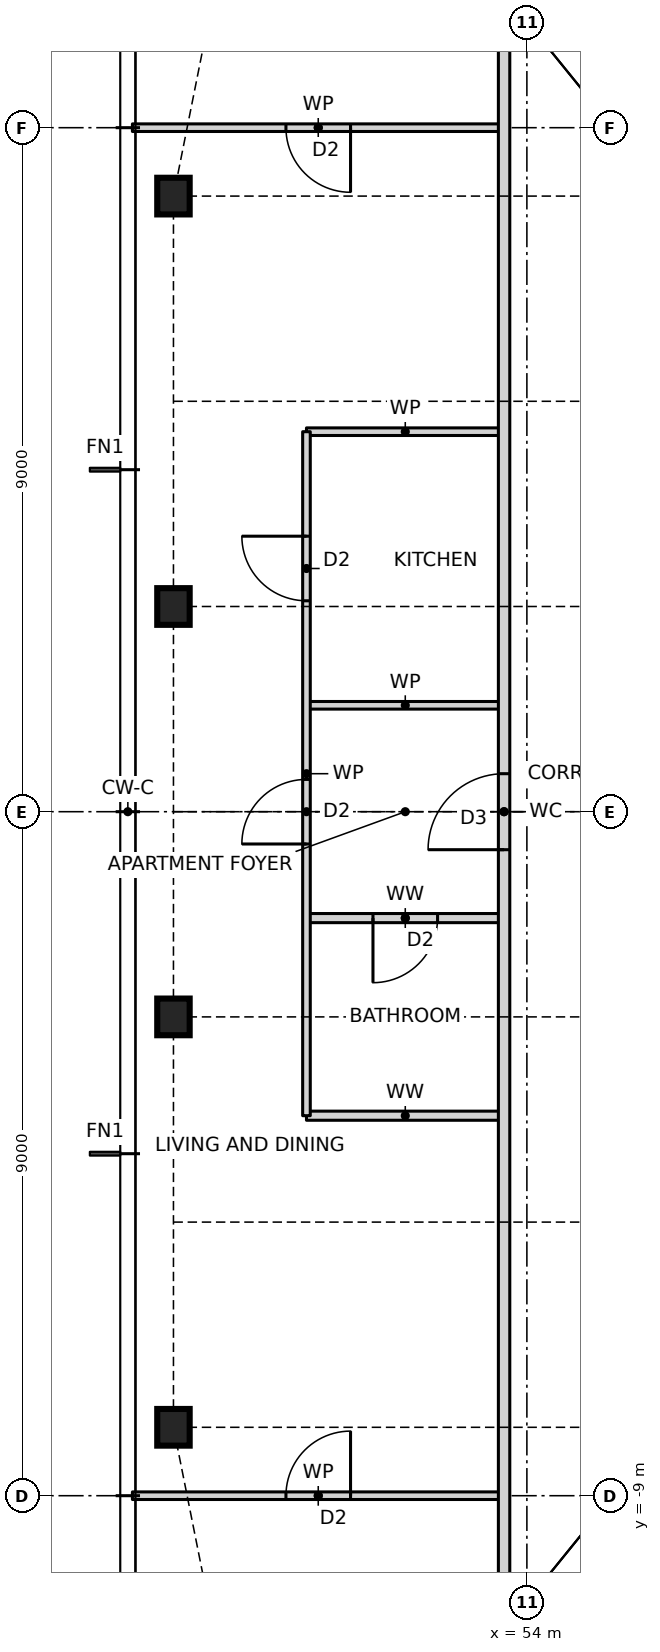
"""IFC4 building model, lengths in metres.
Left out: names, types, materials, properties, quantities, classifications, styles, units other than length and angle.
Written with IfcOpenShell. Run it as: python <this file> out.ifc"""

import sys

from ifc_helpers import new_model, si_unit, direction, frame, frame_2d, origin, origin_2d, place, context, subcontext, project, spatial, rectangle, i_section, extrude, element, fill, save


model = new_model("IFC4")
c1 = context("Model", 3, precision=1e-05, world=origin(), true_north=direction((0.0, 1.0)))
c2 = subcontext(c1, "Body", "Model", "MODEL_VIEW")
j1 = project(units=[si_unit("LENGTHUNIT", "METRE"), si_unit("PLANEANGLEUNIT", "RADIAN")], contexts=[c1])
p1 = place(None, origin())
s1 = spatial("IfcSite", under=j1, at=p1, CompositionType="ELEMENT")
p2 = place(p1, origin())
s2 = spatial("IfcBuilding", under=s1, at=p2, CompositionType="ELEMENT")
p3 = place(p2, frame((0.0, 0.0, 91.0)))
s3 = spatial("IfcBuildingStorey", under=s2, at=p3, CompositionType="ELEMENT", Elevation=91.0)
for number, where, z_axis, x_axis in (
    (1, (49.35, 8.1, 0.0), (0.0, 0.0, 1.0), (1.0, 0.0, 0.0)),
    (2, (49.35, 2.7, 0.0), (0.0, 0.0, 1.0), (1.0, 0.0, 0.0)),
    (3, (49.35, -2.7, 0.0), (0.0, 0.0, 1.0), (1.0, 0.0, 0.0)),
    (4, (49.35, -8.1, 0.0), (0.0, 0.0, 1.0), (1.0, 0.0, 0.0)),
):
    element("IfcColumn", number, at=place(p3, frame(where, z_axis=z_axis, x_axis=x_axis)), inside=s3, PredefinedType="COLUMN", context=c2, shape_type="SweptSolid", body=[
        extrude(i_section(OverallWidth=0.427, OverallDepth=0.483, WebThickness=0.051, FlangeThickness=0.082, at=origin_2d()), origin(), (0.0, 0.0, 1.0), 3.5),
    ])
p4 = place(p3, frame((48.81, -9.0, 0.0), z_axis=(0.0, 0.0, 1.0), x_axis=(1.0, 0.0, 0.0)))
e5 = element("IfcWall", 5, at=p4, inside=s3, PredefinedType="PARTITIONING", context=c2, shape_type="SweptSolid", body=[
    extrude(rectangle(XDim=4.89, YDim=0.1, at=frame_2d((2.445, 0.0))), origin(), (0.0, 0.0, 1.0), 3.27),
])
p5 = place(p4, frame((2.02, 0.0, 0.0)))
e6 = element("IfcOpeningElement", 6, at=p5, cuts=e5, PredefinedType="OPENING", context=c2, shape_type="SweptSolid", body=[
    extrude(rectangle(XDim=0.85, YDim=2.1, at=frame_2d((0.425, 1.05))), frame((0.0, 0.06, 0.0), z_axis=(0.0, -1.0, 0.0), x_axis=(1.0, 0.0, 0.0)), (0.0, 0.0, 1.0), 0.12),
])
p6 = place(p3, frame((51.1, -4.0, 0.0), z_axis=(0.0, 0.0, 1.0), x_axis=(1.0, 0.0, 0.0)))
e7 = element("IfcWall", 7, at=p6, inside=s3, PredefinedType="PARTITIONING", context=c2, shape_type="SweptSolid", body=[
    extrude(rectangle(XDim=2.6, YDim=0.12, at=frame_2d((1.3, 0.0))), origin(), (0.0, 0.0, 1.0), 3.27),
])
p7 = place(p3, frame((51.1, -1.4, 0.0), z_axis=(0.0, 0.0, 1.0), x_axis=(1.0, 0.0, 0.0)))
e8 = element("IfcWall", 8, at=p7, inside=s3, PredefinedType="PARTITIONING", context=c2, shape_type="SweptSolid", body=[
    extrude(rectangle(XDim=2.6, YDim=0.12, at=frame_2d((1.3, 0.0))), origin(), (0.0, 0.0, 1.0), 3.27),
])
p8 = place(p7, frame((0.875, 0.0, 0.0)))
e9 = element("IfcOpeningElement", 9, at=p8, cuts=e8, PredefinedType="OPENING", context=c2, shape_type="SweptSolid", body=[
    extrude(rectangle(XDim=0.85, YDim=2.1, at=frame_2d((0.425, 1.05))), frame((0.0, 0.07, 0.0), z_axis=(0.0, -1.0, 0.0), x_axis=(1.0, 0.0, 0.0)), (0.0, 0.0, 1.0), 0.14),
])
for number, where, z_axis, x_axis in (
    (10, (51.1, 1.4, 0.0), (0.0, 0.0, 1.0), (1.0, 0.0, 0.0)),
    (11, (51.1, 5.0, 0.0), (0.0, 0.0, 1.0), (1.0, 0.0, 0.0)),
):
    element("IfcWall", number, at=place(p3, frame(where, z_axis=z_axis, x_axis=x_axis)), inside=s3, PredefinedType="PARTITIONING", context=c2, shape_type="SweptSolid", body=[
        extrude(rectangle(XDim=2.6, YDim=0.1, at=frame_2d((1.3, 0.0))), origin(), (0.0, 0.0, 1.0), 3.27),
    ])
p9 = place(p3, frame((48.81, 9.0, 0.0), z_axis=(0.0, 0.0, 1.0), x_axis=(1.0, 0.0, 0.0)))
e12 = element("IfcWall", 12, at=p9, inside=s3, PredefinedType="PARTITIONING", context=c2, shape_type="SweptSolid", body=[
    extrude(rectangle(XDim=4.89, YDim=0.1, at=frame_2d((2.445, 0.0))), origin(), (0.0, 0.0, 1.0), 3.27),
])
p10 = place(p9, frame((2.02, 0.0, 0.0)))
e13 = element("IfcOpeningElement", 13, at=p10, cuts=e12, PredefinedType="OPENING", context=c2, shape_type="SweptSolid", body=[
    extrude(rectangle(XDim=0.85, YDim=2.1, at=frame_2d((0.425, 1.05))), frame((0.0, 0.06, 0.0), z_axis=(0.0, -1.0, 0.0), x_axis=(1.0, 0.0, 0.0)), (0.0, 0.0, 1.0), 0.12),
])
p11 = place(p3, frame((53.7, -10.768, 0.0), z_axis=(0.0, 0.0, 1.0), x_axis=(0.0, 1.0, 0.0)))
e14 = element("IfcWall", 14, at=p11, inside=s3, PredefinedType="PARTITIONING", context=c2, shape_type="SweptSolid", body=[
    extrude(rectangle(XDim=21.536, YDim=0.15, at=frame_2d((10.768, 0.0))), origin(), (0.0, 0.0, 1.0), 3.27),
])
p12 = place(p11, frame((10.268, 0.0, 0.0)))
e15 = element("IfcOpeningElement", 15, at=p12, cuts=e14, PredefinedType="OPENING", context=c2, shape_type="SweptSolid", body=[
    extrude(rectangle(XDim=1.0, YDim=2.1, at=frame_2d((0.5, 1.05))), frame((0.0, 0.085, 0.0), z_axis=(0.0, -1.0, 0.0), x_axis=(1.0, 0.0, 0.0)), (0.0, 0.0, 1.0), 0.17),
])
p13 = place(p3, frame((51.1, -4.0, 0.0), z_axis=(0.0, 0.0, 1.0), x_axis=(0.0, 1.0, 0.0)))
e16 = element("IfcWall", 16, at=p13, inside=s3, PredefinedType="PARTITIONING", context=c2, shape_type="SweptSolid", body=[
    extrude(rectangle(XDim=9.0, YDim=0.1, at=frame_2d((4.5, 0.0))), origin(), (0.0, 0.0, 1.0), 3.27),
])
p14 = place(p13, frame((6.775, 0.0, 0.0)))
e17 = element("IfcOpeningElement", 17, at=p14, cuts=e16, PredefinedType="OPENING", context=c2, shape_type="SweptSolid", body=[
    extrude(rectangle(XDim=0.85, YDim=2.1, at=frame_2d((0.425, 1.05))), frame((0.0, 0.06, 0.0), z_axis=(0.0, -1.0, 0.0), x_axis=(1.0, 0.0, 0.0)), (0.0, 0.0, 1.0), 0.12),
])
p15 = place(p13, frame((3.575, 0.0, 0.0)))
e18 = element("IfcOpeningElement", 18, at=p15, cuts=e16, PredefinedType="OPENING", context=c2, shape_type="SweptSolid", body=[
    extrude(rectangle(XDim=0.85, YDim=2.1, at=frame_2d((0.425, 1.05))), frame((0.0, 0.06, 0.0), z_axis=(0.0, -1.0, 0.0), x_axis=(1.0, 0.0, 0.0)), (0.0, 0.0, 1.0), 0.12),
])
p16 = place(p14, origin())
e19 = element("IfcDoor", 19, at=p16, inside=s3, OperationType="SINGLE_SWING_RIGHT", PredefinedType="DOOR", context=c2, shape_type="SweptSolid", body=[
    extrude(rectangle(XDim=0.85, YDim=2.1, at=frame_2d((0.425, 1.05))), frame((0.0, 0.025, 0.0), z_axis=(0.0, -1.0, 0.0), x_axis=(1.0, 0.0, 0.0)), (0.0, 0.0, 1.0), 0.05),
])
fill(e17, e19)
p17 = place(p12, origin())
e20 = element("IfcDoor", 20, at=p17, inside=s3, OperationType="SINGLE_SWING_LEFT", PredefinedType="DOOR", context=c2, shape_type="SweptSolid", body=[
    extrude(rectangle(XDim=1.0, YDim=2.1, at=frame_2d((0.5, 1.05))), frame((0.0, 0.025, 0.0), z_axis=(0.0, -1.0, 0.0), x_axis=(1.0, 0.0, 0.0)), (0.0, 0.0, 1.0), 0.05),
])
fill(e15, e20)
p18 = place(p15, origin())
e21 = element("IfcDoor", 21, at=p18, inside=s3, OperationType="SINGLE_SWING_LEFT", PredefinedType="DOOR", context=c2, shape_type="SweptSolid", body=[
    extrude(rectangle(XDim=0.85, YDim=2.1, at=frame_2d((0.425, 1.05))), frame((0.0, 0.025, 0.0), z_axis=(0.0, -1.0, 0.0), x_axis=(1.0, 0.0, 0.0)), (0.0, 0.0, 1.0), 0.05),
])
fill(e18, e21)
p19 = place(p8, frame((0.85, 0.0, 0.0), z_axis=(0.0, 0.0, 1.0), x_axis=(-1.0, 0.0, 0.0)))
e22 = element("IfcDoor", 22, at=p19, inside=s3, OperationType="SINGLE_SWING_RIGHT", PredefinedType="DOOR", context=c2, shape_type="SweptSolid", body=[
    extrude(rectangle(XDim=0.85, YDim=2.1, at=frame_2d((0.425, 1.05))), frame((0.0, 0.025, 0.0), z_axis=(0.0, -1.0, 0.0), x_axis=(1.0, 0.0, 0.0)), (0.0, 0.0, 1.0), 0.05),
])
fill(e9, e22)
p20 = place(p10, frame((0.85, 0.0, 0.0), z_axis=(0.0, 0.0, 1.0), x_axis=(-1.0, 0.0, 0.0)))
e23 = element("IfcDoor", 23, at=p20, inside=s3, OperationType="SINGLE_SWING_LEFT", PredefinedType="DOOR", context=c2, shape_type="SweptSolid", body=[
    extrude(rectangle(XDim=0.85, YDim=2.1, at=frame_2d((0.425, 1.05))), frame((0.0, 0.025, 0.0), z_axis=(0.0, -1.0, 0.0), x_axis=(1.0, 0.0, 0.0)), (0.0, 0.0, 1.0), 0.05),
])
fill(e13, e23)
p21 = place(p5, origin())
e24 = element("IfcDoor", 24, at=p21, inside=s3, OperationType="SINGLE_SWING_RIGHT", PredefinedType="DOOR", context=c2, shape_type="SweptSolid", body=[
    extrude(rectangle(XDim=0.85, YDim=2.1, at=frame_2d((0.425, 1.05))), frame((0.0, 0.025, 0.0), z_axis=(0.0, -1.0, 0.0), x_axis=(1.0, 0.0, 0.0)), (0.0, 0.0, 1.0), 0.05),
])
fill(e6, e24)
save(model, sys.argv[1])
